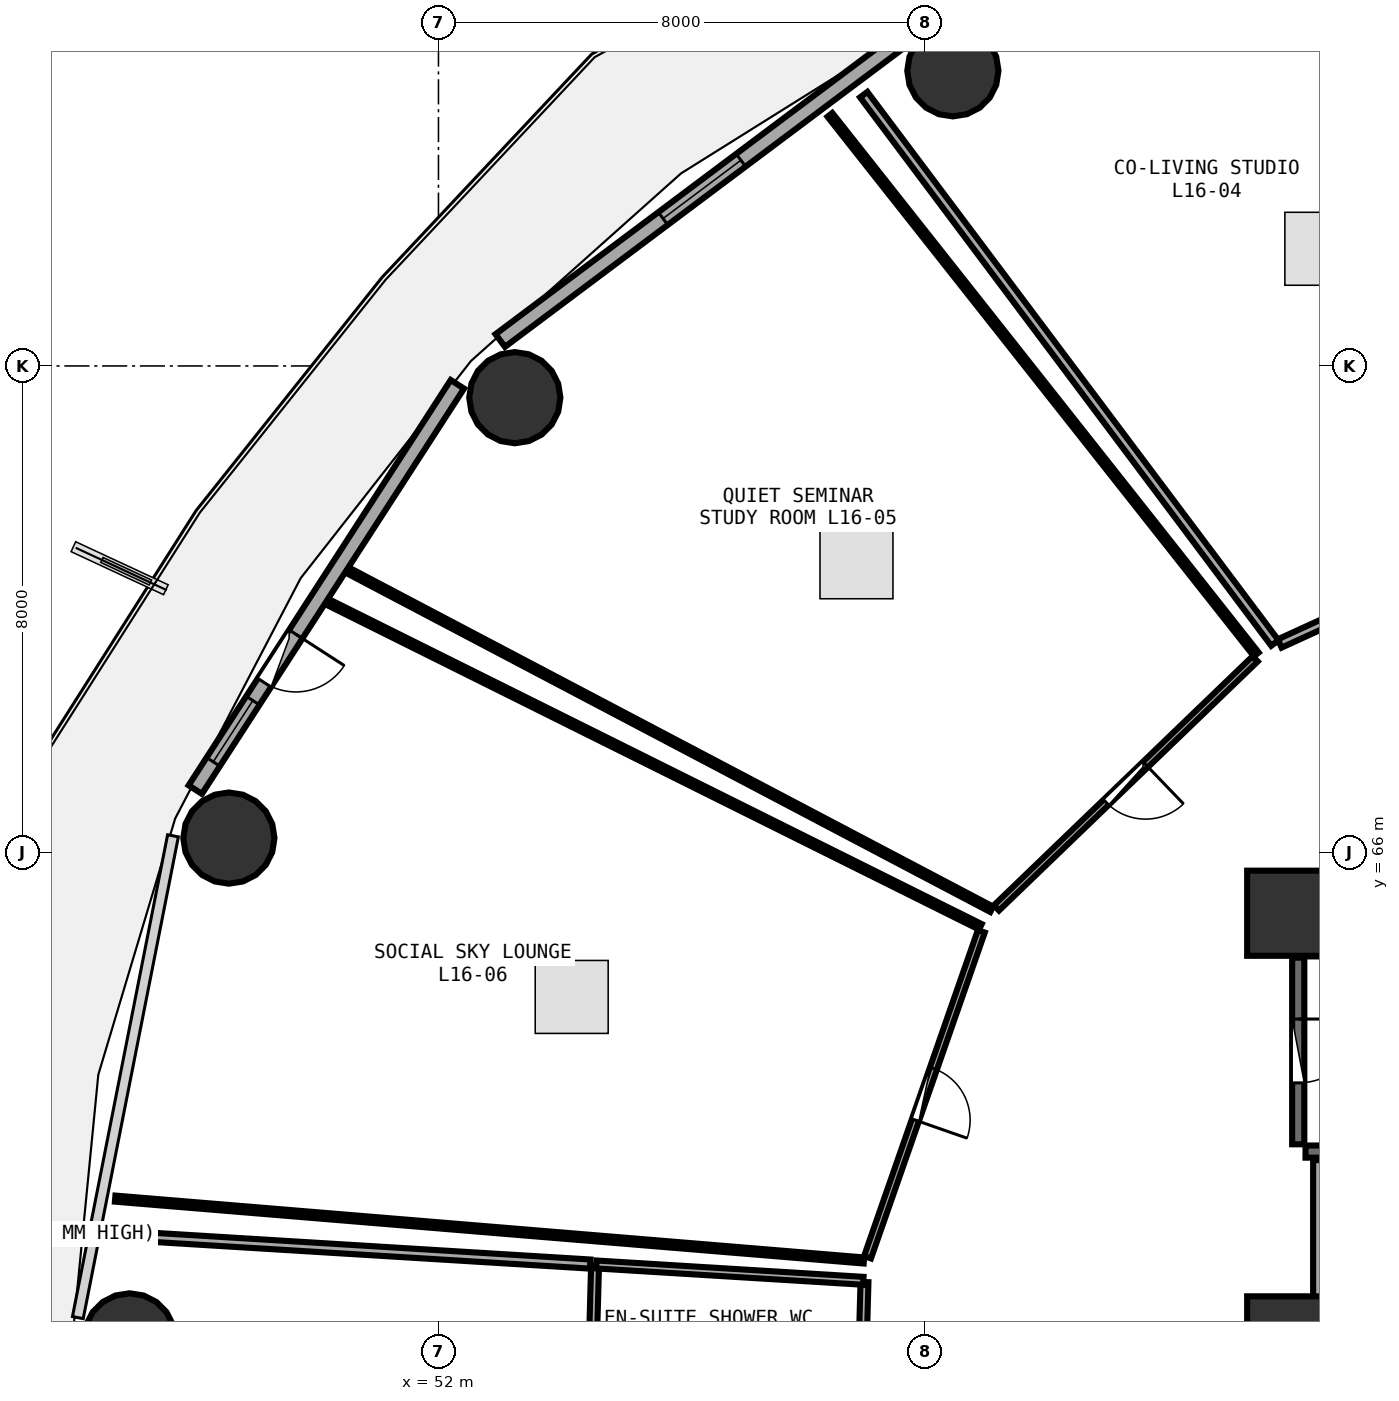
"""IFC4 building model, lengths in metres.
Left out: names, types, materials, properties, quantities, classifications, styles, units other than length and angle.
Written with IfcOpenShell. Run it as: python <this file> out.ifc"""

import sys

from ifc_helpers import new_model, si_unit, direction, frame, frame_2d, origin, origin_2d, place, context, subcontext, project, spatial, rectangle, circle, extrude, element, fill, save


model = new_model("IFC4")
c1 = context("Model", 3, precision=1e-05, world=origin(), true_north=direction((0.0, 1.0)))
c2 = subcontext(c1, "Body", "Model", "MODEL_VIEW")
j1 = project(units=[si_unit("LENGTHUNIT", "METRE"), si_unit("PLANEANGLEUNIT", "RADIAN")], contexts=[c1])
p1 = place(None, origin())
s1 = spatial("IfcSite", under=j1, at=p1, CompositionType="ELEMENT")
p2 = place(p1, origin())
s2 = spatial("IfcBuilding", under=s1, at=p2, CompositionType="ELEMENT")
p3 = place(p2, frame((0.0, 0.0, 63.75)))
s3 = spatial("IfcBuildingStorey", under=s2, at=p3, CompositionType="ELEMENT", Elevation=63.75)
for number, where, z_axis, x_axis in (
    (1, (66.0, 65.0, 0.0), (0.0, 0.0, 1.0), (1.0, 0.0, 0.0)),
    (2, (66.0, 58.0, 0.0), (0.0, 0.0, 1.0), (1.0, 0.0, 0.0)),
):
    element("IfcColumn", number, at=place(p3, frame(where, z_axis=z_axis, x_axis=x_axis)), inside=s3, PredefinedType="PILASTER", context=c2, shape_type="SweptSolid", body=[
        extrude(rectangle(XDim=1.4, YDim=1.4, at=origin_2d()), origin(), (0.0, 0.0, 1.0), 3.75),
    ])
for number, where, z_axis, x_axis in (
    (3, (60.46, 78.854, 0.0), (0.0, 0.0, 1.0), (1.0, 0.0, 0.0)),
    (4, (53.256, 73.478, 0.0), (0.0, 0.0, 1.0), (1.0, 0.0, 0.0)),
    (5, (48.553, 66.236, 0.0), (0.0, 0.0, 1.0), (1.0, 0.0, 0.0)),
    (6, (46.92, 58.0, 0.0), (0.0, 0.0, 1.0), (1.0, 0.0, 0.0)),
):
    element("IfcColumn", number, at=place(p3, frame(where, z_axis=z_axis, x_axis=x_axis)), inside=s3, PredefinedType="COLUMN", context=c2, shape_type="SweptSolid", body=[
        extrude(circle(Radius=0.75, at=origin_2d()), origin(), (0.0, 0.0, 1.0), 3.75),
    ])
p4 = place(p3, frame((59.651, 79.389, 0.0), z_axis=(0.0, 0.0, 1.0), x_axis=(-0.80030733173, -0.599590005569, 0.0)))
e7 = element("IfcWall", 7, at=p4, inside=s3, PredefinedType="SOLIDWALL", context=c2, shape_type="SweptSolid", body=[
    extrude(rectangle(XDim=8.291, YDim=0.26, at=frame_2d((4.145, 0.0))), origin(), (0.0, 0.0, 1.0), 3.475),
])
p5 = place(p4, frame((3.345, 0.0, 0.85)))
e8 = element("IfcOpeningElement", 8, at=p5, cuts=e7, PredefinedType="OPENING", context=c2, shape_type="SweptSolid", body=[
    extrude(rectangle(XDim=1.6, YDim=1.45, at=frame_2d((0.8, 0.725))), frame((0.0, 0.14, 0.0), z_axis=(0.0, -1.0, 0.0), x_axis=(1.0, 0.0, 0.0)), (0.0, 0.0, 1.0), 0.28),
])
p6 = place(p3, frame((52.311, 73.698, 0.0), z_axis=(0.0, 0.0, 1.0), x_axis=(-0.543005114258, -0.839729388488, 0.0)))
e9 = element("IfcWall", 9, at=p6, inside=s3, PredefinedType="SOLIDWALL", context=c2, shape_type="SweptSolid", body=[
    extrude(rectangle(XDim=7.938, YDim=0.26, at=frame_2d((3.969, 0.0))), origin(), (0.0, 0.0, 1.0), 3.475),
])
p7 = place(p6, frame((4.894, 0.0, 0.0)))
e10 = element("IfcOpeningElement", 10, at=p7, cuts=e9, PredefinedType="OPENING", context=c2, shape_type="SweptSolid", body=[
    extrude(rectangle(XDim=0.95, YDim=2.1, at=frame_2d((0.475, 1.05))), frame((0.0, 0.14, 0.0), z_axis=(0.0, -1.0, 0.0), x_axis=(1.0, 0.0, 0.0)), (0.0, 0.0, 1.0), 0.28),
])
p8 = place(p6, frame((6.194, 0.0, 0.85)))
e11 = element("IfcOpeningElement", 11, at=p8, cuts=e9, PredefinedType="OPENING", context=c2, shape_type="SweptSolid", body=[
    extrude(rectangle(XDim=1.2, YDim=1.45, at=frame_2d((0.6, 0.725))), frame((0.0, 0.14, 0.0), z_axis=(0.0, -1.0, 0.0), x_axis=(1.0, 0.0, 0.0)), (0.0, 0.0, 1.0), 0.28),
])
for number, where, z_axis, x_axis in (
    (12, (66.26, 61.08, 0.0), (0.0, 0.0, 1.0), (1.0, 0.0, 0.0)),
    (13, (73.42, 64.39, 0.0), (0.0, 0.0, 1.0), (-1.0, 0.0, 0.0)),
):
    element("IfcWall", number, at=place(p3, frame(where, z_axis=z_axis, x_axis=x_axis)), inside=s3, PredefinedType="SHEAR", context=c2, shape_type="SweptSolid", body=[
        extrude(rectangle(XDim=7.16, YDim=0.2, at=frame_2d((3.58, 0.0))), origin(), (0.0, 0.0, 1.0), 3.49),
    ])
p9 = place(p3, frame((66.14, 64.27, 0.0), z_axis=(0.0, 0.0, 1.0), x_axis=(0.0, -1.0, 0.0)))
e14 = element("IfcWall", 14, at=p9, inside=s3, PredefinedType="SHEAR", context=c2, shape_type="SweptSolid", body=[
    extrude(rectangle(XDim=3.07, YDim=0.2, at=frame_2d((1.535, 0.0))), origin(), (0.0, 0.0, 1.0), 3.49),
])
p10 = place(p9, frame((1.01, 0.0, 0.0)))
e15 = element("IfcOpeningElement", 15, at=p10, cuts=e14, PredefinedType="OPENING", context=c2, shape_type="SweptSolid", body=[
    extrude(rectangle(XDim=1.05, YDim=2.1, at=frame_2d((0.525, 1.05))), frame((0.0, 0.11, 0.0), z_axis=(0.0, -1.0, 0.0), x_axis=(1.0, 0.0, 0.0)), (0.0, 0.0, 1.0), 0.22),
])
p11 = place(p3, frame((66.45, 58.35, 0.0), z_axis=(0.0, 0.0, 1.0), x_axis=(1.0, 0.0, 0.0)))
e16 = element("IfcWall", 16, at=p11, inside=s3, PredefinedType="SOLIDWALL", context=c2, shape_type="SweptSolid", body=[
    extrude(rectangle(XDim=6.0, YDim=0.2, at=frame_2d((3.0, 0.0))), origin(), (0.0, 0.0, 1.0), 3.48),
])
p12 = place(p11, frame((0.4, 0.0, 0.0)))
e17 = element("IfcOpeningElement", 17, at=p12, cuts=e16, PredefinedType="OPENING", context=c2, shape_type="SweptSolid", body=[
    extrude(rectangle(XDim=1.1, YDim=2.1, at=frame_2d((0.55, 1.05))), frame((0.0, 0.11, 0.0), z_axis=(0.0, -1.0, 0.0), x_axis=(1.0, 0.0, 0.0)), (0.0, 0.0, 1.0), 0.22),
])
p13 = place(p11, frame((2.4, 0.0, 0.0)))
e18 = element("IfcOpeningElement", 18, at=p13, cuts=e16, PredefinedType="OPENING", context=c2, shape_type="SweptSolid", body=[
    extrude(rectangle(XDim=1.1, YDim=2.1, at=frame_2d((0.55, 1.05))), frame((0.0, 0.11, 0.0), z_axis=(0.0, -1.0, 0.0), x_axis=(1.0, 0.0, 0.0)), (0.0, 0.0, 1.0), 0.22),
])
p14 = place(p11, frame((4.4, 0.0, 0.0)))
e19 = element("IfcOpeningElement", 19, at=p14, cuts=e16, PredefinedType="OPENING", context=c2, shape_type="SweptSolid", body=[
    extrude(rectangle(XDim=1.1, YDim=2.1, at=frame_2d((0.55, 1.05))), frame((0.0, 0.11, 0.0), z_axis=(0.0, -1.0, 0.0), x_axis=(1.0, 0.0, 0.0)), (0.0, 0.0, 1.0), 0.22),
])
p15 = place(p3, frame((66.46, 58.48, 0.0), z_axis=(0.0, 0.0, 1.0), x_axis=(0.0, 1.0, 0.0)))
e20 = element("IfcWall", 20, at=p15, inside=s3, PredefinedType="PARTITIONING", context=c2, shape_type="SweptSolid", body=[
    extrude(rectangle(XDim=2.46, YDim=0.15, at=frame_2d((1.23, 0.0))), origin(), (0.0, 0.0, 1.0), 3.48),
])
p16 = place(p3, frame((68.708, 70.751, 0.0), z_axis=(0.0, 0.0, 1.0), x_axis=(-0.909329201607, -0.416077400378, 0.0)))
e21 = element("IfcWall", 21, at=p16, inside=s3, PredefinedType="PARTITIONING", context=c2, shape_type="SweptSolid", body=[
    extrude(rectangle(XDim=3.16, YDim=0.15, at=frame_2d((1.58, 0.0))), origin(), (0.0, 0.0, 1.0), 3.48),
])
p17 = place(p16, frame((1.105, 0.0, 0.0)))
e22 = element("IfcOpeningElement", 22, at=p17, cuts=e21, PredefinedType="OPENING", context=c2, shape_type="SweptSolid", body=[
    extrude(rectangle(XDim=0.95, YDim=2.08, at=frame_2d((0.475, 1.04))), frame((0.0, 0.085, 0.0), z_axis=(0.0, -1.0, 0.0), x_axis=(1.0, 0.0, 0.0)), (0.0, 0.0, 1.0), 0.17),
])
p18 = place(p3, frame((65.432, 69.183, 0.0), z_axis=(0.0, 0.0, 1.0), x_axis=(-0.720434955678, -0.69352251199, 0.0)))
e23 = element("IfcWall", 23, at=p18, inside=s3, PredefinedType="PARTITIONING", context=c2, shape_type="SweptSolid", body=[
    extrude(rectangle(XDim=5.906, YDim=0.12, at=frame_2d((2.953, 0.0))), origin(), (0.0, 0.0, 1.0), 2.875),
])
p19 = place(p18, frame((2.503, 0.0, 0.0)))
e24 = element("IfcOpeningElement", 24, at=p19, cuts=e23, PredefinedType="OPENING", context=c2, shape_type="SweptSolid", body=[
    extrude(rectangle(XDim=0.9, YDim=2.08, at=frame_2d((0.45, 1.04))), frame((0.0, 0.07, 0.0), z_axis=(0.0, -1.0, 0.0), x_axis=(1.0, 0.0, 0.0)), (0.0, 0.0, 1.0), 0.14),
])
p20 = place(p3, frame((60.928, 64.702, 0.0), z_axis=(0.0, 0.0, 1.0), x_axis=(-0.329626249966, -0.944111505773, 0.0)))
e25 = element("IfcWall", 25, at=p20, inside=s3, PredefinedType="PARTITIONING", context=c2, shape_type="SweptSolid", body=[
    extrude(rectangle(XDim=5.677, YDim=0.12, at=frame_2d((2.839, 0.0))), origin(), (0.0, 0.0, 1.0), 3.48),
])
p21 = place(p20, frame((2.389, 0.0, 0.0)))
e26 = element("IfcOpeningElement", 26, at=p21, cuts=e25, PredefinedType="OPENING", context=c2, shape_type="SweptSolid", body=[
    extrude(rectangle(XDim=0.9, YDim=2.08, at=frame_2d((0.45, 1.04))), frame((0.0, 0.07, 0.0), z_axis=(0.0, -1.0, 0.0), x_axis=(1.0, 0.0, 0.0)), (0.0, 0.0, 1.0), 0.14),
])
p22 = place(p3, frame((65.756, 69.443, 0.0), z_axis=(0.0, 0.0, 1.0), x_axis=(-0.599892569248, 0.800080561794, 0.0)))
e27 = element("IfcWall", 27, at=p22, inside=s3, PredefinedType="PARTITIONING", context=c2, shape_type="SweptSolid", body=[
    extrude(rectangle(XDim=11.272, YDim=0.15, at=frame_2d((5.636, 0.0))), origin(), (0.0, 0.0, 1.0), 2.875),
])
p23 = place(p3, frame((61.099, 65.065, 0.0), z_axis=(0.0, 0.0, 1.0), x_axis=(-0.884914680824, 0.46575316173, 0.0)))
e28 = element("IfcWall", 28, at=p23, inside=s3, PredefinedType="PARTITIONING", context=c2, shape_type="SweptSolid", body=[
    extrude(rectangle(XDim=11.963, YDim=0.1, at=frame_2d((5.981, 0.0))), origin(), (0.0, 0.0, 1.0), 2.875),
])
p24 = place(p3, frame((58.438, 78.13, 0.0), z_axis=(0.0, 0.0, 1.0), x_axis=(0.620037561985, -0.78457212653, 0.0)))
e29 = element("IfcWall", 29, at=p24, inside=s3, PredefinedType="PARTITIONING", context=c2, shape_type="SweptSolid", body=[
    extrude(rectangle(XDim=11.31, YDim=0.1, at=frame_2d((5.655, 0.0))), origin(), (0.0, 0.0, 1.0), 2.875),
])
p25 = place(p3, frame((58.997, 59.289, 0.0), z_axis=(0.0, 0.0, 1.0), x_axis=(-0.996604780232, 0.08233414856, 0.0)))
e30 = element("IfcWall", 30, at=p25, inside=s3, PredefinedType="PARTITIONING", context=c2, shape_type="SweptSolid", body=[
    extrude(rectangle(XDim=12.356, YDim=0.1, at=frame_2d((6.178, 0.0))), origin(), (0.0, 0.0, 1.0), 2.875),
])
p26 = place(p3, frame((50.173, 70.121, 0.0), z_axis=(0.0, 0.0, 1.0), x_axis=(0.895272258208, -0.445519453764, 0.0)))
e31 = element("IfcWall", 31, at=p26, inside=s3, PredefinedType="PARTITIONING", context=c2, shape_type="SweptSolid", body=[
    extrude(rectangle(XDim=11.996, YDim=0.1, at=frame_2d((5.998, 0.0))), origin(), (0.0, 0.0, 1.0), 2.875),
])
p27 = place(p3, frame((59.007, 58.934, 0.0), z_axis=(0.0, 0.0, 1.0), x_axis=(-0.027750076623, -0.99961489247, 0.0)))
e32 = element("IfcWall", 32, at=p27, inside=s3, PredefinedType="PLUMBINGWALL", context=c2, shape_type="SweptSolid", body=[
    extrude(rectangle(XDim=1.197, YDim=0.13, at=frame_2d((0.598, 0.0))), origin(), (0.0, 0.0, 1.0), 2.875),
])
p28 = place(p3, frame((54.533, 57.658, 0.0), z_axis=(0.0, 0.0, 1.0), x_axis=(0.02760506688, 0.999618907526, 0.0)))
e33 = element("IfcWall", 33, at=p28, inside=s3, PredefinedType="PLUMBINGWALL", context=c2, shape_type="SweptSolid", body=[
    extrude(rectangle(XDim=1.548, YDim=0.13, at=frame_2d((0.774, 0.0))), origin(), (0.0, 0.0, 1.0), 2.875),
])
p29 = place(p3, frame((54.596, 59.224, 0.0), z_axis=(0.0, 0.0, 1.0), x_axis=(0.998131655241, -0.061099908397, 0.0)))
e34 = element("IfcWall", 34, at=p29, inside=s3, PredefinedType="PLUMBINGWALL", context=c2, shape_type="SweptSolid", body=[
    extrude(rectangle(XDim=4.399, YDim=0.13, at=frame_2d((2.2, 0.0))), origin(), (0.0, 0.0, 1.0), 3.175),
])
p30 = place(p3, frame((46.627, 59.712, 0.0), z_axis=(0.0, 0.0, 1.0), x_axis=(0.998135541011, -0.0610363971, 0.0)))
e35 = element("IfcWall", 35, at=p30, inside=s3, PredefinedType="PARTITIONING", context=c2, shape_type="SweptSolid", body=[
    extrude(rectangle(XDim=7.884, YDim=0.15, at=frame_2d((3.942, 0.0))), origin(), (0.0, 0.0, 1.0), 2.875),
])
p31 = place(p5, origin())
e36 = element("IfcWindow", 36, at=p31, inside=s3, PartitioningType="SINGLE_PANEL", PredefinedType="WINDOW", context=c2, shape_type="SweptSolid", body=[
    extrude(rectangle(XDim=1.6, YDim=1.45, at=frame_2d((0.8, 0.725))), frame((0.0, 0.03, 0.0), z_axis=(0.0, -1.0, 0.0), x_axis=(1.0, 0.0, 0.0)), (0.0, 0.0, 1.0), 0.06),
])
fill(e8, e36)
p32 = place(p7, frame((0.95, 0.0, 0.0), z_axis=(0.0, 0.0, 1.0), x_axis=(-1.0, 0.0, 0.0)))
e37 = element("IfcDoor", 37, at=p32, inside=s3, OperationType="SINGLE_SWING_RIGHT", PredefinedType="DOOR", context=c2, shape_type="SweptSolid", body=[
    extrude(rectangle(XDim=0.95, YDim=2.1, at=frame_2d((0.475, 1.05))), frame((0.0, 0.025, 0.0), z_axis=(0.0, -1.0, 0.0), x_axis=(1.0, 0.0, 0.0)), (0.0, 0.0, 1.0), 0.05),
])
fill(e10, e37)
p33 = place(p8, origin())
e38 = element("IfcWindow", 38, at=p33, inside=s3, PartitioningType="SINGLE_PANEL", PredefinedType="WINDOW", context=c2, shape_type="SweptSolid", body=[
    extrude(rectangle(XDim=1.2, YDim=1.45, at=frame_2d((0.6, 0.725))), frame((0.0, 0.03, 0.0), z_axis=(0.0, -1.0, 0.0), x_axis=(1.0, 0.0, 0.0)), (0.0, 0.0, 1.0), 0.06),
])
fill(e11, e38)
p34 = place(p10, origin())
e39 = element("IfcDoor", 39, at=p34, inside=s3, OperationType="SINGLE_SWING_LEFT", PredefinedType="DOOR", context=c2, shape_type="SweptSolid", body=[
    extrude(rectangle(XDim=1.05, YDim=2.1, at=frame_2d((0.525, 1.05))), frame((0.0, 0.025, 0.0), z_axis=(0.0, -1.0, 0.0), x_axis=(1.0, 0.0, 0.0)), (0.0, 0.0, 1.0), 0.05),
])
fill(e15, e39)
p35 = place(p19, origin())
e40 = element("IfcDoor", 40, at=p35, inside=s3, OperationType="SINGLE_SWING_LEFT", PredefinedType="DOOR", context=c2, shape_type="SweptSolid", body=[
    extrude(rectangle(XDim=0.9, YDim=2.08, at=frame_2d((0.45, 1.04))), frame((0.0, 0.025, 0.0), z_axis=(0.0, -1.0, 0.0), x_axis=(1.0, 0.0, 0.0)), (0.0, 0.0, 1.0), 0.05),
])
fill(e24, e40)
p36 = place(p21, origin())
e41 = element("IfcDoor", 41, at=p36, inside=s3, OperationType="SINGLE_SWING_RIGHT", PredefinedType="DOOR", context=c2, shape_type="SweptSolid", body=[
    extrude(rectangle(XDim=0.9, YDim=2.08, at=frame_2d((0.45, 1.04))), frame((0.0, 0.025, 0.0), z_axis=(0.0, -1.0, 0.0), x_axis=(1.0, 0.0, 0.0)), (0.0, 0.0, 1.0), 0.05),
])
fill(e26, e41)
save(model, sys.argv[1])
